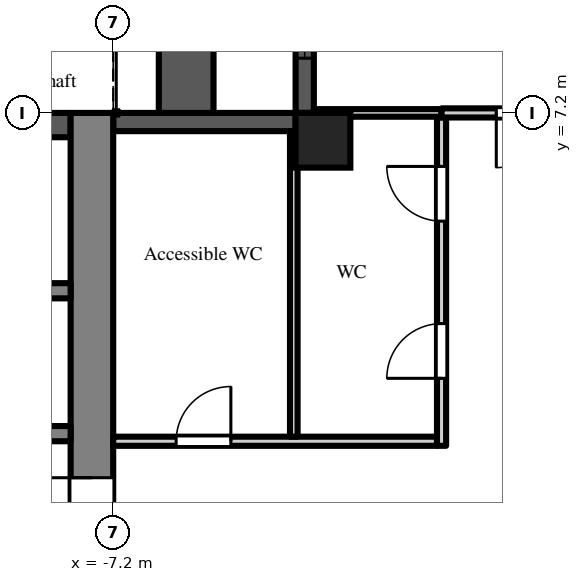
"""IFC4 building model, lengths in metres.
Left out: names, types, materials, properties, quantities, classifications, styles, units other than length and angle.
Written with IfcOpenShell. Run it as: python <this file> out.ifc"""

import sys

from ifc_helpers import new_model, si_unit, direction, frame, frame_2d, origin, origin_2d, place, context, subcontext, project, spatial, rectangle, extrude, element, fill, save


model = new_model("IFC4")
c1 = context("Model", 3, precision=1e-05, world=origin(), true_north=direction((0.0, 1.0)))
c2 = subcontext(c1, "Body", "Model", "MODEL_VIEW")
j1 = project(units=[si_unit("LENGTHUNIT", "METRE"), si_unit("PLANEANGLEUNIT", "RADIAN")], contexts=[c1])
p1 = place(None, origin())
s1 = spatial("IfcSite", under=j1, at=p1, CompositionType="ELEMENT")
p2 = place(p1, origin())
s2 = spatial("IfcBuilding", under=s1, at=p2, CompositionType="ELEMENT")
p3 = place(p2, frame((0.0, 0.0, 237.9)))
s3 = spatial("IfcBuildingStorey", under=s2, at=p3, CompositionType="ELEMENT", Elevation=237.9)
p4 = place(p3, frame((-3.75, 6.75, 0.0), z_axis=(0.0, 0.0, 1.0), x_axis=(1.0, 0.0, 0.0)))
e1 = element("IfcColumn", 1, at=p4, inside=s3, PredefinedType="COLUMN", context=c2, shape_type="SweptSolid", body=[
    extrude(rectangle(XDim=0.9, YDim=0.9, at=origin_2d()), origin(), (0.0, 0.0, 1.0), 4.2),
])
p5 = place(p3, frame((-4.05, 14.4, 0.0), z_axis=(0.0, 0.0, 1.0), x_axis=(0.0, -1.0, 0.0)))
e2 = element("IfcWall", 2, at=p5, inside=s3, PredefinedType="SOLIDWALL", context=c2, shape_type="SweptSolid", body=[
    extrude(rectangle(XDim=7.2, YDim=0.3, at=frame_2d((3.6, 0.0))), origin(), (0.0, 0.0, 1.0), 3.75),
])
p6 = place(p5, frame((3.0, 0.0, 0.0)))
e3 = element("IfcOpeningElement", 3, at=p6, cuts=e2, PredefinedType="OPENING", context=c2, shape_type="SweptSolid", body=[
    extrude(rectangle(XDim=1.2, YDim=2.05, at=frame_2d((0.6, 1.025))), frame((0.0, 0.16, 0.0), z_axis=(0.0, -1.0, 0.0), x_axis=(1.0, 0.0, 0.0)), (0.0, 0.0, 1.0), 0.32),
])
p7 = place(p5, frame((0.9, 0.0, 0.2)))
e4 = element("IfcOpeningElement", 4, at=p7, cuts=e2, PredefinedType="OPENING", context=c2, shape_type="SweptSolid", body=[
    extrude(rectangle(XDim=1.8, YDim=1.85, at=frame_2d((0.9, 0.925))), frame((0.0, 0.16, 0.0), z_axis=(0.0, -1.0, 0.0), x_axis=(1.0, 0.0, 0.0)), (0.0, 0.0, 1.0), 0.32),
])
p8 = place(p5, frame((4.5, 0.0, 0.2)))
e5 = element("IfcOpeningElement", 5, at=p8, cuts=e2, PredefinedType="OPENING", context=c2, shape_type="SweptSolid", body=[
    extrude(rectangle(XDim=1.8, YDim=1.85, at=frame_2d((0.9, 0.925))), frame((0.0, 0.16, 0.0), z_axis=(0.0, -1.0, 0.0), x_axis=(1.0, 0.0, 0.0)), (0.0, 0.0, 1.0), 0.32),
])
p9 = place(p3, frame((-4.2, 7.05, 0.0), z_axis=(0.0, 0.0, 1.0), x_axis=(-1.0, 0.0, 0.0)))
e6 = element("IfcWall", 6, at=p9, inside=s3, PredefinedType="SOLIDWALL", context=c2, shape_type="SweptSolid", body=[
    extrude(rectangle(XDim=3.0, YDim=0.3, at=frame_2d((1.5, 0.0))), origin(), (0.0, 0.0, 1.0), 3.75),
])
p10 = place(p3, frame((-6.0, 7.2, 0.0), z_axis=(0.0, 0.0, 1.0), x_axis=(0.0, 1.0, 0.0)))
e7 = element("IfcWall", 7, at=p10, inside=s3, PredefinedType="PARAPET", context=c2, shape_type="SweptSolid", body=[
    extrude(rectangle(XDim=7.2, YDim=0.9, at=frame_2d((3.6, 0.0))), origin(), (0.0, 0.0, 1.0), 0.8),
])
p11 = place(p3, frame((-7.55, -7.2, 0.0), z_axis=(0.0, 0.0, 1.0), x_axis=(0.0, 1.0, 0.0)))
e8 = element("IfcWall", 8, at=p11, inside=s3, PredefinedType="SHEAR", context=c2, shape_type="SweptSolid", body=[
    extrude(rectangle(XDim=14.4, YDim=0.7, at=frame_2d((7.2, 0.0))), origin(), (0.0, 0.0, 1.0), 3.75),
])
p12 = place(p11, frame((6.0, 0.0, 0.0)))
e9 = element("IfcOpeningElement", 9, at=p12, cuts=e8, PredefinedType="OPENING", context=c2, shape_type="SweptSolid", body=[
    extrude(rectangle(XDim=2.4, YDim=2.2, at=frame_2d((1.2, 1.1))), frame((0.0, 0.36, 0.0), z_axis=(0.0, -1.0, 0.0), x_axis=(1.0, 0.0, 0.0)), (0.0, 0.0, 1.0), 0.72),
])
p13 = place(p3, frame((-7.9, 7.0, 0.0), z_axis=(0.0, 0.0, 1.0), x_axis=(-1.0, 0.0, 0.0)))
e10 = element("IfcWall", 10, at=p13, inside=s3, PredefinedType="SHEAR", context=c2, shape_type="SweptSolid", body=[
    extrude(rectangle(XDim=12.95, YDim=0.4, at=frame_2d((6.475, 0.0))), origin(), (0.0, 0.0, 1.0), 3.75),
])
p14 = place(p3, frame((-7.9, 1.925, 0.0), z_axis=(0.0, 0.0, 1.0), x_axis=(-1.0, 0.0, 0.0)))
e11 = element("IfcWall", 11, at=p14, inside=s3, PredefinedType="SHEAR", context=c2, shape_type="SweptSolid", body=[
    extrude(rectangle(XDim=12.95, YDim=0.25, at=frame_2d((6.475, 0.0))), origin(), (0.0, 0.0, 1.0), 3.75),
])
p15 = place(p14, frame((4.825, 0.0, 0.0)))
e12 = element("IfcOpeningElement", 12, at=p15, cuts=e11, PredefinedType="OPENING", context=c2, shape_type="SweptSolid", body=[
    extrude(rectangle(XDim=1.1, YDim=2.1, at=frame_2d((0.55, 1.05))), frame((0.0, 0.135, 0.0), z_axis=(0.0, -1.0, 0.0), x_axis=(1.0, 0.0, 0.0)), (0.0, 0.0, 1.0), 0.27),
])
p16 = place(p14, frame((7.025, 0.0, 0.0)))
e13 = element("IfcOpeningElement", 13, at=p16, cuts=e11, PredefinedType="OPENING", context=c2, shape_type="SweptSolid", body=[
    extrude(rectangle(XDim=1.1, YDim=2.1, at=frame_2d((0.55, 1.05))), frame((0.0, 0.135, 0.0), z_axis=(0.0, -1.0, 0.0), x_axis=(1.0, 0.0, 0.0)), (0.0, 0.0, 1.0), 0.27),
])
p17 = place(p14, frame((9.225, 0.0, 0.0)))
e14 = element("IfcOpeningElement", 14, at=p17, cuts=e11, PredefinedType="OPENING", context=c2, shape_type="SweptSolid", body=[
    extrude(rectangle(XDim=1.1, YDim=2.1, at=frame_2d((0.55, 1.05))), frame((0.0, 0.135, 0.0), z_axis=(0.0, -1.0, 0.0), x_axis=(1.0, 0.0, 0.0)), (0.0, 0.0, 1.0), 0.27),
])
p18 = place(p14, frame((0.525, 0.0, 0.0)))
e15 = element("IfcOpeningElement", 15, at=p18, cuts=e11, PredefinedType="OPENING", context=c2, shape_type="SweptSolid", body=[
    extrude(rectangle(XDim=0.9, YDim=2.1, at=frame_2d((0.45, 1.05))), frame((0.0, 0.135, 0.0), z_axis=(0.0, -1.0, 0.0), x_axis=(1.0, 0.0, 0.0)), (0.0, 0.0, 1.0), 0.27),
])
p19 = place(p14, frame((2.575, 0.0, 0.0)))
e16 = element("IfcOpeningElement", 16, at=p19, cuts=e11, PredefinedType="OPENING", context=c2, shape_type="SweptSolid", body=[
    extrude(rectangle(XDim=1.2, YDim=2.1, at=frame_2d((0.6, 1.05))), frame((0.0, 0.135, 0.0), z_axis=(0.0, -1.0, 0.0), x_axis=(1.0, 0.0, 0.0)), (0.0, 0.0, 1.0), 0.27),
])
p20 = place(p14, frame((11.525, 0.0, 0.0)))
e17 = element("IfcOpeningElement", 17, at=p20, cuts=e11, PredefinedType="OPENING", context=c2, shape_type="SweptSolid", body=[
    extrude(rectangle(XDim=0.9, YDim=2.1, at=frame_2d((0.45, 1.05))), frame((0.0, 0.135, 0.0), z_axis=(0.0, -1.0, 0.0), x_axis=(1.0, 0.0, 0.0)), (0.0, 0.0, 1.0), 0.27),
])
p21 = place(p3, frame((-7.9, 4.275, 0.0), z_axis=(0.0, 0.0, 1.0), x_axis=(-1.0, 0.0, 0.0)))
e18 = element("IfcWall", 18, at=p21, inside=s3, PredefinedType="SHEAR", context=c2, shape_type="SweptSolid", body=[
    extrude(rectangle(XDim=1.95, YDim=0.25, at=frame_2d((0.975, 0.0))), origin(), (0.0, 0.0, 1.0), 3.75),
])
p22 = place(p3, frame((-7.2, 1.8, 0.0), z_axis=(0.0, 0.0, 1.0), x_axis=(1.0, 0.0, 0.0)))
e19 = element("IfcWall", 19, at=p22, inside=s3, PredefinedType="PARTITIONING", context=c2, shape_type="SweptSolid", body=[
    extrude(rectangle(XDim=5.325, YDim=0.15, at=frame_2d((2.663, 0.0))), origin(), (0.0, 0.0, 1.0), 3.75),
])
p23 = place(p22, frame((1.035, 0.0, 0.0)))
e20 = element("IfcOpeningElement", 20, at=p23, cuts=e19, PredefinedType="OPENING", context=c2, shape_type="SweptSolid", body=[
    extrude(rectangle(XDim=0.9, YDim=2.1, at=frame_2d((0.45, 1.05))), frame((0.0, 0.085, 0.0), z_axis=(0.0, -1.0, 0.0), x_axis=(1.0, 0.0, 0.0)), (0.0, 0.0, 1.0), 0.17),
])
p24 = place(p3, frame((-4.23, 1.875, 0.0), z_axis=(0.0, 0.0, 1.0), x_axis=(0.0, 1.0, 0.0)))
e21 = element("IfcWall", 21, at=p24, inside=s3, PredefinedType="PARTITIONING", context=c2, shape_type="SweptSolid", body=[
    extrude(rectangle(XDim=5.025, YDim=0.125, at=frame_2d((2.512, 0.0))), origin(), (0.0, 0.0, 1.0), 3.75),
])
p25 = place(p3, frame((-3.9, 7.2, 0.0), z_axis=(0.0, 0.0, 1.0), x_axis=(1.0, 0.0, 0.0)))
e22 = element("IfcWall", 22, at=p25, inside=s3, PredefinedType="PARTITIONING", context=c2, shape_type="SweptSolid", body=[
    extrude(rectangle(XDim=2.1, YDim=0.125, at=frame_2d((1.05, 0.0))), origin(), (0.0, 0.0, 1.0), 3.75),
])
p26 = place(p3, frame((-1.8, 1.725, 0.0), z_axis=(0.0, 0.0, 1.0), x_axis=(0.0, 1.0, 0.0)))
e23 = element("IfcWall", 23, at=p26, inside=s3, PredefinedType="PARTITIONING", context=c2, shape_type="SweptSolid", body=[
    extrude(rectangle(XDim=5.4, YDim=0.15, at=frame_2d((2.7, 0.0))), origin(), (0.0, 0.0, 1.0), 3.75),
])
p27 = place(p26, frame((1.11, 0.0, 0.0)))
e24 = element("IfcOpeningElement", 24, at=p27, cuts=e23, PredefinedType="OPENING", context=c2, shape_type="SweptSolid", body=[
    extrude(rectangle(XDim=0.9, YDim=2.1, at=frame_2d((0.45, 1.05))), frame((0.0, 0.085, 0.0), z_axis=(0.0, -1.0, 0.0), x_axis=(1.0, 0.0, 0.0)), (0.0, 0.0, 1.0), 0.17),
])
p28 = place(p26, frame((3.695, 0.0, 0.0)))
e25 = element("IfcOpeningElement", 25, at=p28, cuts=e23, PredefinedType="OPENING", context=c2, shape_type="SweptSolid", body=[
    extrude(rectangle(XDim=0.9, YDim=2.1, at=frame_2d((0.45, 1.05))), frame((0.0, 0.085, 0.0), z_axis=(0.0, -1.0, 0.0), x_axis=(1.0, 0.0, 0.0)), (0.0, 0.0, 1.0), 0.17),
])
p29 = place(p3, frame((-1.8, 7.2, 0.0), z_axis=(0.0, 0.0, 1.0), x_axis=(1.0, 0.0, 0.0)))
e26 = element("IfcWall", 26, at=p29, inside=s3, PredefinedType="PARTITIONING", context=c2, shape_type="SweptSolid", body=[
    extrude(rectangle(XDim=3.6, YDim=0.15, at=frame_2d((1.8, 0.0))), origin(), (0.0, 0.0, 1.0), 3.75),
])
p30 = place(p29, frame((0.9, 0.0, 0.0)))
e27 = element("IfcOpeningElement", 27, at=p30, cuts=e26, PredefinedType="OPENING", context=c2, shape_type="SweptSolid", body=[
    extrude(rectangle(XDim=1.8, YDim=2.1, at=frame_2d((0.9, 1.05))), frame((0.0, 0.085, 0.0), z_axis=(0.0, -1.0, 0.0), x_axis=(1.0, 0.0, 0.0)), (0.0, 0.0, 1.0), 0.17),
])
p31 = place(p8, origin())
e28 = element("IfcWindow", 28, at=p31, inside=s3, PartitioningType="SINGLE_PANEL", PredefinedType="WINDOW", context=c2, shape_type="SweptSolid", body=[
    extrude(rectangle(XDim=1.8, YDim=1.85, at=frame_2d((0.9, 0.925))), frame((0.0, 0.03, 0.0), z_axis=(0.0, -1.0, 0.0), x_axis=(1.0, 0.0, 0.0)), (0.0, 0.0, 1.0), 0.06),
])
fill(e5, e28)
p32 = place(p12, origin())
e29 = element("IfcDoor", 29, at=p32, inside=s3, OperationType="DOUBLE_DOOR_DOUBLE_SWING", PredefinedType="DOOR", context=c2, shape_type="SweptSolid", body=[
    extrude(rectangle(XDim=2.4, YDim=2.2, at=frame_2d((1.2, 1.1))), frame((0.0, 0.025, 0.0), z_axis=(0.0, -1.0, 0.0), x_axis=(1.0, 0.0, 0.0)), (0.0, 0.0, 1.0), 0.05),
])
fill(e9, e29)
p33 = place(p27, origin())
e30 = element("IfcDoor", 30, at=p33, inside=s3, OperationType="SINGLE_SWING_LEFT", PredefinedType="DOOR", context=c2, shape_type="SweptSolid", body=[
    extrude(rectangle(XDim=0.9, YDim=2.1, at=frame_2d((0.45, 1.05))), frame((0.0, 0.025, 0.0), z_axis=(0.0, -1.0, 0.0), x_axis=(1.0, 0.0, 0.0)), (0.0, 0.0, 1.0), 0.05),
])
fill(e24, e30)
p34 = place(p28, origin())
e31 = element("IfcDoor", 31, at=p34, inside=s3, OperationType="SINGLE_SWING_RIGHT", PredefinedType="DOOR", context=c2, shape_type="SweptSolid", body=[
    extrude(rectangle(XDim=0.9, YDim=2.1, at=frame_2d((0.45, 1.05))), frame((0.0, 0.025, 0.0), z_axis=(0.0, -1.0, 0.0), x_axis=(1.0, 0.0, 0.0)), (0.0, 0.0, 1.0), 0.05),
])
fill(e25, e31)
p35 = place(p23, origin())
e32 = element("IfcDoor", 32, at=p35, inside=s3, OperationType="SINGLE_SWING_RIGHT", PredefinedType="DOOR", context=c2, shape_type="SweptSolid", body=[
    extrude(rectangle(XDim=0.9, YDim=2.1, at=frame_2d((0.45, 1.05))), frame((0.0, 0.025, 0.0), z_axis=(0.0, -1.0, 0.0), x_axis=(1.0, 0.0, 0.0)), (0.0, 0.0, 1.0), 0.05),
])
fill(e20, e32)
p36 = place(p30, frame((1.8, 0.0, 0.0), z_axis=(0.0, 0.0, 1.0), x_axis=(-1.0, 0.0, 0.0)))
e33 = element("IfcDoor", 33, at=p36, inside=s3, OperationType="DOUBLE_DOOR_DOUBLE_SWING", PredefinedType="DOOR", context=c2, shape_type="SweptSolid", body=[
    extrude(rectangle(XDim=1.8, YDim=2.1, at=frame_2d((0.9, 1.05))), frame((0.0, 0.025, 0.0), z_axis=(0.0, -1.0, 0.0), x_axis=(1.0, 0.0, 0.0)), (0.0, 0.0, 1.0), 0.05),
])
fill(e27, e33)
save(model, sys.argv[1])
